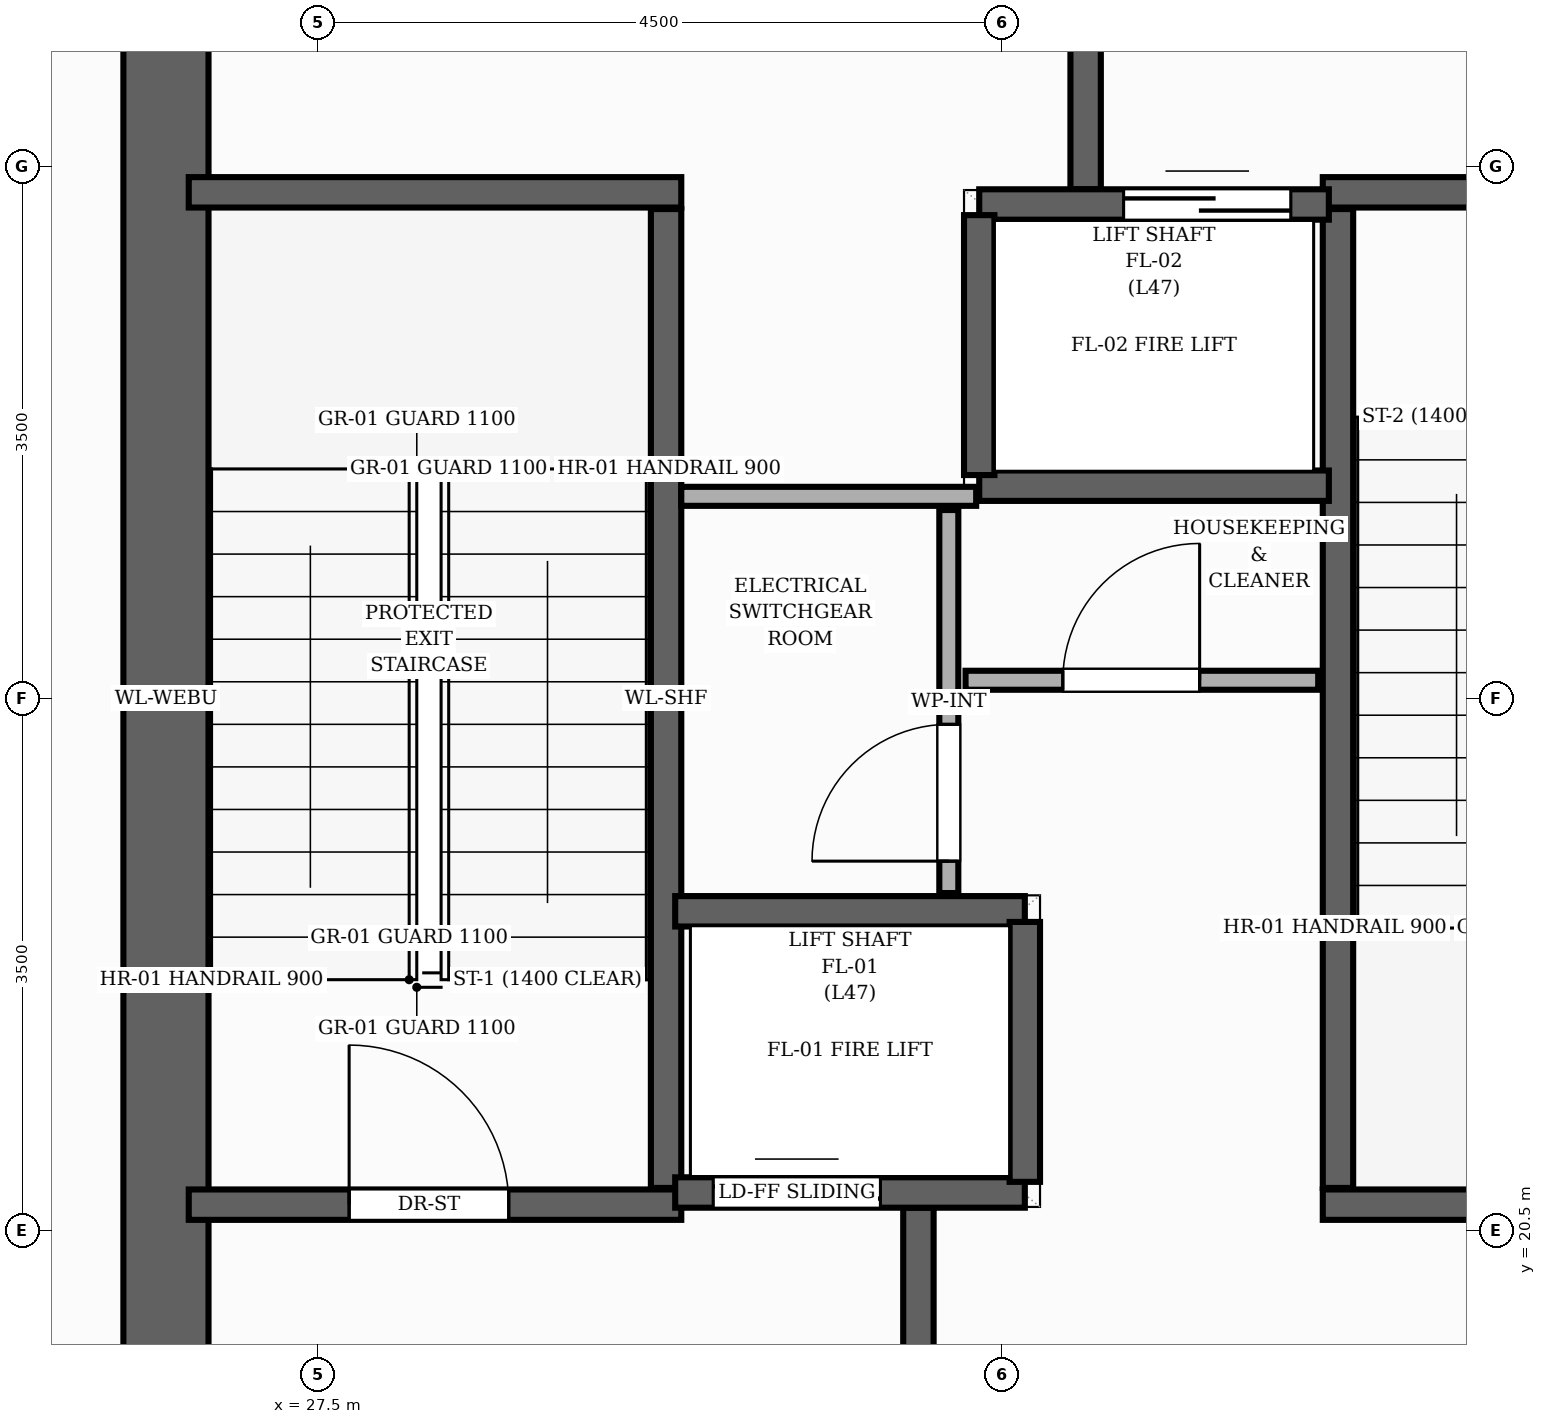
"""IFC4 building model, lengths in metres.
Left out: names, types, materials, properties, quantities, classifications, styles, units other than length and angle.
Written with IfcOpenShell. Run it as: python <this file> out.ifc"""

import sys

from ifc_helpers import new_model, si_unit, direction, frame, frame_2d, origin, place, context, subcontext, project, spatial, rectangle, extrude, element, fill, save


model = new_model("IFC4")
c1 = context("Model", 3, precision=1e-05, world=origin(), true_north=direction((0.0, 1.0)))
c2 = subcontext(c1, "Body", "Model", "MODEL_VIEW")
j1 = project(units=[si_unit("LENGTHUNIT", "METRE"), si_unit("PLANEANGLEUNIT", "RADIAN")], contexts=[c1])
p1 = place(None, origin())
s1 = spatial("IfcSite", under=j1, at=p1, CompositionType="ELEMENT")
p2 = place(p1, origin())
s2 = spatial("IfcBuilding", under=s1, at=p2, CompositionType="ELEMENT")
p3 = place(p2, frame((0.0, 0.0, 158.56)))
s3 = spatial("IfcBuildingStorey", under=s2, at=p3, CompositionType="ELEMENT", Elevation=158.56)
p4 = place(p3, frame((26.5, 17.3, 0.0), z_axis=(0.0, 0.0, 1.0), x_axis=(0.0, 1.0, 0.0)))
e1 = element("IfcWall", 1, at=p4, inside=s3, PredefinedType="SHEAR", context=c2, shape_type="SweptSolid", body=[
    extrude(rectangle(XDim=13.4, YDim=0.56, at=frame_2d((6.7, 0.0))), origin(), (0.0, 0.0, 1.0), 4.48),
])
p5 = place(p3, frame((29.79, 20.78, 0.0), z_axis=(0.0, 0.0, 1.0), x_axis=(0.0, 1.0, 0.0)))
e2 = element("IfcWall", 2, at=p5, inside=s3, PredefinedType="SHEAR", context=c2, shape_type="SweptSolid", body=[
    extrude(rectangle(XDim=6.44, YDim=0.2, at=frame_2d((3.22, 0.0))), origin(), (0.0, 0.0, 1.0), 4.48),
])
p6 = place(p3, frame((26.65, 27.33, 0.0), z_axis=(0.0, 0.0, 1.0), x_axis=(1.0, 0.0, 0.0)))
e3 = element("IfcWall", 3, at=p6, inside=s3, PredefinedType="SHEAR", context=c2, shape_type="SweptSolid", body=[
    extrude(rectangle(XDim=3.24, YDim=0.2, at=frame_2d((1.62, 0.0))), origin(), (0.0, 0.0, 1.0), 4.48),
])
p7 = place(p3, frame((26.65, 20.67, 0.0), z_axis=(0.0, 0.0, 1.0), x_axis=(1.0, 0.0, 0.0)))
e4 = element("IfcWall", 4, at=p7, inside=s3, PredefinedType="SHEAR", context=c2, shape_type="SweptSolid", body=[
    extrude(rectangle(XDim=3.24, YDim=0.2, at=frame_2d((1.62, 0.0))), origin(), (0.0, 0.0, 1.0), 4.48),
])
p8 = place(p7, frame((1.055, 0.0, 0.0)))
e5 = element("IfcOpeningElement", 5, at=p8, cuts=e4, PredefinedType="OPENING", context=c2, shape_type="SweptSolid", body=[
    extrude(rectangle(XDim=1.05, YDim=2.15, at=frame_2d((0.525, 1.075))), frame((0.0, 0.11, 0.0), z_axis=(0.0, -1.0, 0.0), x_axis=(1.0, 0.0, 0.0)), (0.0, 0.0, 1.0), 0.22),
])
p9 = place(p3, frame((34.21, 20.78, 0.0), z_axis=(0.0, 0.0, 1.0), x_axis=(0.0, 1.0, 0.0)))
e6 = element("IfcWall", 6, at=p9, inside=s3, PredefinedType="SHEAR", context=c2, shape_type="SweptSolid", body=[
    extrude(rectangle(XDim=6.44, YDim=0.2, at=frame_2d((3.22, 0.0))), origin(), (0.0, 0.0, 1.0), 4.48),
])
p10 = place(p3, frame((34.11, 20.67, 0.0), z_axis=(0.0, 0.0, 1.0), x_axis=(1.0, 0.0, 0.0)))
e7 = element("IfcWall", 7, at=p10, inside=s3, PredefinedType="SHEAR", context=c2, shape_type="SweptSolid", body=[
    extrude(rectangle(XDim=3.24, YDim=0.2, at=frame_2d((1.62, 0.0))), origin(), (0.0, 0.0, 1.0), 4.48),
])
p11 = place(p3, frame((34.11, 27.33, 0.0), z_axis=(0.0, 0.0, 1.0), x_axis=(1.0, 0.0, 0.0)))
e8 = element("IfcWall", 8, at=p11, inside=s3, PredefinedType="SHEAR", context=c2, shape_type="SweptSolid", body=[
    extrude(rectangle(XDim=3.24, YDim=0.2, at=frame_2d((1.62, 0.0))), origin(), (0.0, 0.0, 1.0), 4.48),
])
p12 = place(p11, frame((1.135, 0.0, 0.0)))
e9 = element("IfcOpeningElement", 9, at=p12, cuts=e8, PredefinedType="OPENING", context=c2, shape_type="SweptSolid", body=[
    extrude(rectangle(XDim=1.05, YDim=2.15, at=frame_2d((0.525, 1.075))), frame((0.0, 0.11, 0.0), z_axis=(0.0, -1.0, 0.0), x_axis=(1.0, 0.0, 0.0)), (0.0, 0.0, 1.0), 0.22),
])
for number, where, z_axis, x_axis in (
    (10, (31.45, 17.15, 0.0), (0.0, 0.0, 1.0), (0.0, 1.0, 0.0)),
    (11, (32.55, 27.35, 0.0), (0.0, 0.0, 1.0), (0.0, 1.0, 0.0)),
):
    element("IfcWall", number, at=place(p3, frame(where, z_axis=z_axis, x_axis=x_axis)), inside=s3, PredefinedType="SHEAR", context=c2, shape_type="SweptSolid", body=[
        extrude(rectangle(XDim=3.5, YDim=0.2, at=frame_2d((1.75, 0.0))), origin(), (0.0, 0.0, 1.0), 4.48),
    ])
p13 = place(p3, frame((29.85, 20.75, 0.0), z_axis=(0.0, 0.0, 1.0), x_axis=(1.0, 0.0, 0.0)))
e12 = element("IfcWall", 12, at=p13, inside=s3, PredefinedType="SHEAR", context=c2, shape_type="SweptSolid", body=[
    extrude(rectangle(XDim=2.3, YDim=0.2, at=frame_2d((1.15, 0.0))), origin(), (0.0, 0.0, 1.0), 4.48),
])
p14 = place(p13, frame((0.25, 0.0, 0.0)))
e13 = element("IfcOpeningElement", 13, at=p14, cuts=e12, PredefinedType="OPENING", context=c2, shape_type="SweptSolid", body=[
    extrude(rectangle(XDim=1.1, YDim=2.15, at=frame_2d((0.55, 1.075))), frame((0.0, 0.11, 0.0), z_axis=(0.0, -1.0, 0.0), x_axis=(1.0, 0.0, 0.0)), (0.0, 0.0, 1.0), 0.22),
])
p15 = place(p3, frame((29.85, 22.6, 0.0), z_axis=(0.0, 0.0, 1.0), x_axis=(1.0, 0.0, 0.0)))
e14 = element("IfcWall", 14, at=p15, inside=s3, PredefinedType="SHEAR", context=c2, shape_type="SweptSolid", body=[
    extrude(rectangle(XDim=2.3, YDim=0.2, at=frame_2d((1.15, 0.0))), origin(), (0.0, 0.0, 1.0), 4.48),
])
p16 = place(p3, frame((32.15, 20.82, 0.0), z_axis=(0.0, 0.0, 1.0), x_axis=(0.0, 1.0, 0.0)))
e15 = element("IfcWall", 15, at=p16, inside=s3, PredefinedType="SHEAR", context=c2, shape_type="SweptSolid", body=[
    extrude(rectangle(XDim=1.71, YDim=0.2, at=frame_2d((0.855, 0.0))), origin(), (0.0, 0.0, 1.0), 4.48),
])
p17 = place(p3, frame((31.85, 27.25, 0.0), z_axis=(0.0, 0.0, 1.0), x_axis=(1.0, 0.0, 0.0)))
e16 = element("IfcWall", 16, at=p17, inside=s3, PredefinedType="SHEAR", context=c2, shape_type="SweptSolid", body=[
    extrude(rectangle(XDim=2.3, YDim=0.2, at=frame_2d((1.15, 0.0))), origin(), (0.0, 0.0, 1.0), 4.48),
])
p18 = place(p17, frame((0.95, 0.0, 0.0)))
e17 = element("IfcOpeningElement", 17, at=p18, cuts=e16, PredefinedType="OPENING", context=c2, shape_type="SweptSolid", body=[
    extrude(rectangle(XDim=1.1, YDim=2.15, at=frame_2d((0.55, 1.075))), frame((0.0, 0.11, 0.0), z_axis=(0.0, -1.0, 0.0), x_axis=(1.0, 0.0, 0.0)), (0.0, 0.0, 1.0), 0.22),
])
p19 = place(p3, frame((31.85, 25.4, 0.0), z_axis=(0.0, 0.0, 1.0), x_axis=(1.0, 0.0, 0.0)))
e18 = element("IfcWall", 18, at=p19, inside=s3, PredefinedType="SHEAR", context=c2, shape_type="SweptSolid", body=[
    extrude(rectangle(XDim=2.3, YDim=0.2, at=frame_2d((1.15, 0.0))), origin(), (0.0, 0.0, 1.0), 4.48),
])
p20 = place(p3, frame((31.85, 25.47, 0.0), z_axis=(0.0, 0.0, 1.0), x_axis=(0.0, 1.0, 0.0)))
e19 = element("IfcWall", 19, at=p20, inside=s3, PredefinedType="SHEAR", context=c2, shape_type="SweptSolid", body=[
    extrude(rectangle(XDim=1.71, YDim=0.2, at=frame_2d((0.855, 0.0))), origin(), (0.0, 0.0, 1.0), 4.48),
])
p21 = place(p3, frame((31.65, 22.72, 0.0), z_axis=(0.0, 0.0, 1.0), x_axis=(0.0, 1.0, 0.0)))
e20 = element("IfcWall", 20, at=p21, inside=s3, PredefinedType="PARTITIONING", context=c2, shape_type="SweptSolid", body=[
    extrude(rectangle(XDim=2.52, YDim=0.125, at=frame_2d((1.26, 0.0))), origin(), (0.0, 0.0, 1.0), 4.235),
])
p22 = place(p21, frame((0.21, 0.0, 0.0)))
e21 = element("IfcOpeningElement", 21, at=p22, cuts=e20, PredefinedType="OPENING", context=c2, shape_type="SweptSolid", body=[
    extrude(rectangle(XDim=0.9, YDim=2.1, at=frame_2d((0.45, 1.05))), frame((0.0, 0.073, 0.0), z_axis=(0.0, -1.0, 0.0), x_axis=(1.0, 0.0, 0.0)), (0.0, 0.0, 1.0), 0.145),
])
p23 = place(p3, frame((31.76, 24.12, 0.0), z_axis=(0.0, 0.0, 1.0), x_axis=(1.0, 0.0, 0.0)))
e22 = element("IfcWall", 22, at=p23, inside=s3, PredefinedType="PARTITIONING", context=c2, shape_type="SweptSolid", body=[
    extrude(rectangle(XDim=2.32, YDim=0.125, at=frame_2d((1.16, 0.0))), origin(), (0.0, 0.0, 1.0), 4.235),
])
p24 = place(p23, frame((0.64, 0.0, 0.0)))
e23 = element("IfcOpeningElement", 23, at=p24, cuts=e22, PredefinedType="OPENING", context=c2, shape_type="SweptSolid", body=[
    extrude(rectangle(XDim=0.9, YDim=2.1, at=frame_2d((0.45, 1.05))), frame((0.0, 0.073, 0.0), z_axis=(0.0, -1.0, 0.0), x_axis=(1.0, 0.0, 0.0)), (0.0, 0.0, 1.0), 0.145),
])
p25 = place(p3, frame((29.89, 25.33, 0.0), z_axis=(0.0, 0.0, 1.0), x_axis=(1.0, 0.0, 0.0)))
e24 = element("IfcWall", 24, at=p25, inside=s3, PredefinedType="PARTITIONING", context=c2, shape_type="SweptSolid", body=[
    extrude(rectangle(XDim=1.94, YDim=0.125, at=frame_2d((0.97, 0.0))), origin(), (0.0, 0.0, 1.0), 4.235),
])
p26 = place(p8, origin())
e25 = element("IfcDoor", 25, at=p26, inside=s3, OperationType="SINGLE_SWING_LEFT", PredefinedType="DOOR", context=c2, shape_type="SweptSolid", body=[
    extrude(rectangle(XDim=1.05, YDim=2.15, at=frame_2d((0.525, 1.075))), frame((0.0, 0.025, 0.0), z_axis=(0.0, -1.0, 0.0), x_axis=(1.0, 0.0, 0.0)), (0.0, 0.0, 1.0), 0.05),
])
fill(e5, e25)
p27 = place(p14, origin())
e26 = element("IfcDoor", 26, at=p27, inside=s3, OperationType="DOUBLE_DOOR_SLIDING", PredefinedType="DOOR", context=c2, shape_type="SweptSolid", body=[
    extrude(rectangle(XDim=1.1, YDim=2.15, at=frame_2d((0.55, 1.075))), frame((0.0, 0.025, 0.0), z_axis=(0.0, -1.0, 0.0), x_axis=(1.0, 0.0, 0.0)), (0.0, 0.0, 1.0), 0.05),
])
fill(e13, e26)
p28 = place(p18, origin())
e27 = element("IfcDoor", 27, at=p28, inside=s3, OperationType="DOUBLE_DOOR_SLIDING", PredefinedType="DOOR", context=c2, shape_type="SweptSolid", body=[
    extrude(rectangle(XDim=1.1, YDim=2.15, at=frame_2d((0.55, 1.075))), frame((0.0, 0.025, 0.0), z_axis=(0.0, -1.0, 0.0), x_axis=(1.0, 0.0, 0.0)), (0.0, 0.0, 1.0), 0.05),
])
fill(e17, e27)
p29 = place(p22, origin())
e28 = element("IfcDoor", 28, at=p29, inside=s3, OperationType="SINGLE_SWING_LEFT", PredefinedType="DOOR", context=c2, shape_type="SweptSolid", body=[
    extrude(rectangle(XDim=0.9, YDim=2.1, at=frame_2d((0.45, 1.05))), frame((0.0, 0.025, 0.0), z_axis=(0.0, -1.0, 0.0), x_axis=(1.0, 0.0, 0.0)), (0.0, 0.0, 1.0), 0.05),
])
fill(e21, e28)
p30 = place(p24, origin())
e29 = element("IfcDoor", 29, at=p30, inside=s3, OperationType="SINGLE_SWING_RIGHT", PredefinedType="DOOR", context=c2, shape_type="SweptSolid", body=[
    extrude(rectangle(XDim=0.9, YDim=2.1, at=frame_2d((0.45, 1.05))), frame((0.0, 0.025, 0.0), z_axis=(0.0, -1.0, 0.0), x_axis=(1.0, 0.0, 0.0)), (0.0, 0.0, 1.0), 0.05),
])
fill(e23, e29)
save(model, sys.argv[1])
